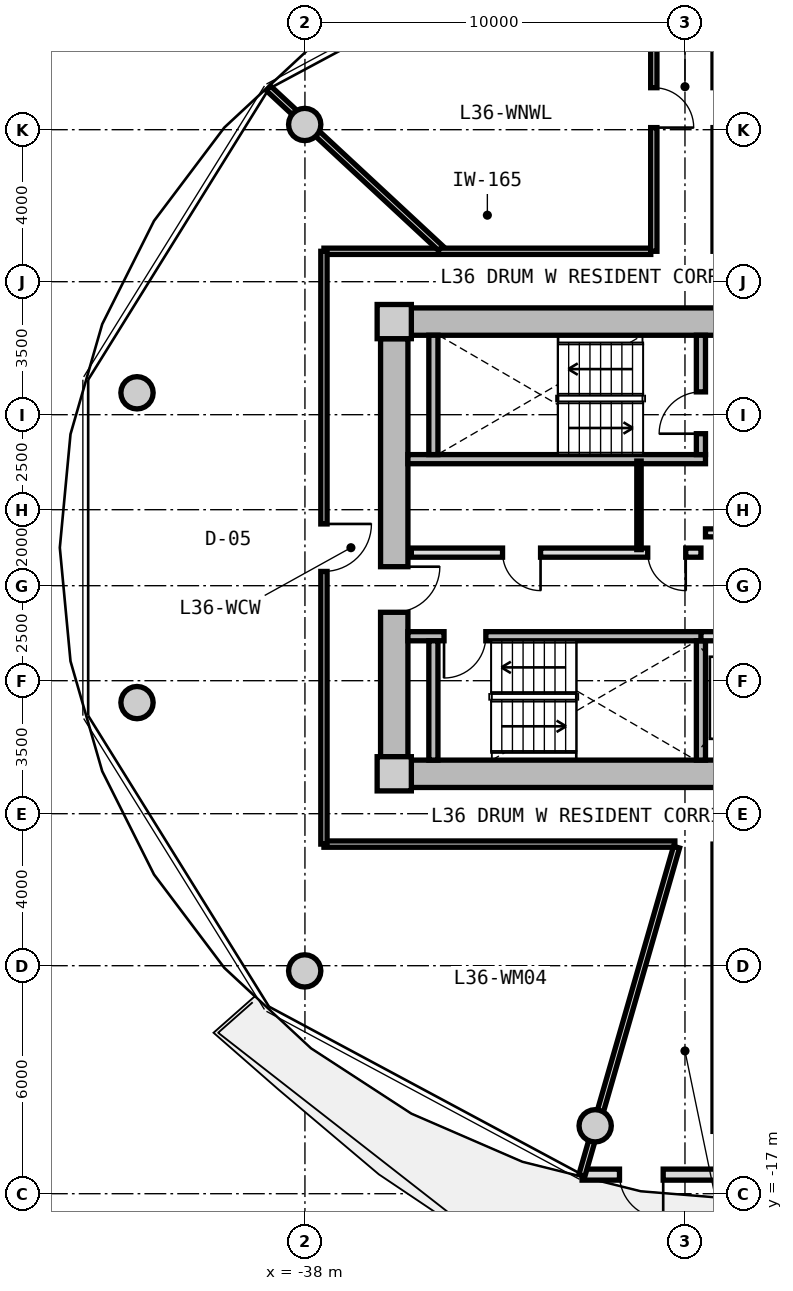
"""IFC4 building model, lengths in metres.
Left out: names, types, materials, properties, quantities, classifications, styles, units other than length and angle.
Written with IfcOpenShell. Run it as: python <this file> out.ifc"""

import sys

from ifc_helpers import new_model, si_unit, direction, frame, frame_2d, origin, origin_2d, place, context, subcontext, project, spatial, rectangle, circle, extrude, source, transform, mapped, element, fill, save


model = new_model("IFC4")
c1 = context("Model", 3, precision=1e-05, world=origin(), true_north=direction((0.0, 1.0)))
c2 = subcontext(c1, "Body", "Model", "MODEL_VIEW")
j1 = project(units=[si_unit("LENGTHUNIT", "METRE"), si_unit("PLANEANGLEUNIT", "RADIAN")], contexts=[c1])
p1 = place(None, origin())
s1 = spatial("IfcSite", under=j1, at=p1, CompositionType="ELEMENT")
p2 = place(p1, origin())
s2 = spatial("IfcBuilding", under=s1, at=p2, CompositionType="ELEMENT")
p3 = place(p2, frame((0.0, 0.0, 117.6)))
s3 = spatial("IfcBuildingStorey", under=s2, at=p3, CompositionType="ELEMENT", Elevation=117.6)
m1 = source(origin(), c2, "Body", "SweptSolid", [
    extrude(rectangle(XDim=0.9, YDim=0.9, at=origin_2d()), origin(), (0.0, 0.0, 1.0), 3.05),
])
for number, where, z_axis, x_axis in (
    (1, (-35.65, -5.95, 0.0), (0.0, 0.0, 1.0), (1.0, 0.0, 0.0)),
    (2, (-35.65, 5.95, 0.0), (0.0, 0.0, 1.0), (1.0, 0.0, 0.0)),
):
    element("IfcColumn", number, at=place(p3, frame(where, z_axis=z_axis, x_axis=x_axis)), inside=s3, PredefinedType="COLUMN", context=c2, shape_type="MappedRepresentation", body=[
        mapped(m1, transform((0.0, 0.0, 0.0), x_axis=(1.0, 0.0, 0.0), y_axis=(0.0, 1.0, 0.0), z_axis=(0.0, 0.0, 1.0), scale=1.0)),
    ])
m2 = source(origin(), c2, "Body", "SweptSolid", [
    extrude(rectangle(XDim=14.4, YDim=0.72, at=frame_2d((7.2, 0.0))), origin(), (0.0, 0.0, 1.0), 2.79),
])
for number, where, z_axis, x_axis in (
    (3, (-35.2, 5.95, 0.0), (0.0, 0.0, 1.0), (1.0, 0.0, 0.0)),
    (4, (-20.8, -5.95, 0.0), (0.0, 0.0, 1.0), (-1.0, 0.0, 0.0)),
):
    element("IfcWall", number, at=place(p3, frame(where, z_axis=z_axis, x_axis=x_axis)), inside=s3, PredefinedType="SHEAR", context=c2, shape_type="MappedRepresentation", body=[
        mapped(m2, transform((0.0, 0.0, 0.0), x_axis=(1.0, 0.0, 0.0), y_axis=(0.0, 1.0, 0.0), z_axis=(0.0, 0.0, 1.0), scale=1.0)),
    ])
m3 = source(origin(), c2, "Body", "SweptSolid", [
    extrude(rectangle(XDim=11.0, YDim=0.72, at=frame_2d((5.5, 0.0))), origin(), (0.0, 0.0, 1.0), 2.79),
])
p4 = place(p3, frame((-35.65, -5.5, 0.0), z_axis=(0.0, 0.0, 1.0), x_axis=(0.0, 1.0, 0.0)))
e5 = element("IfcWall", 5, at=p4, inside=s3, PredefinedType="SHEAR", context=c2, shape_type="MappedRepresentation", body=[
    mapped(m3, transform((0.0, 0.0, 0.0), x_axis=(1.0, 0.0, 0.0), y_axis=(0.0, 1.0, 0.0), z_axis=(0.0, 0.0, 1.0), scale=1.0)),
])
p5 = place(p4, frame((3.8, 0.0, 0.0)))
e6 = element("IfcOpeningElement", 6, at=p5, cuts=e5, PredefinedType="OPENING", context=c2, shape_type="SweptSolid", body=[
    extrude(rectangle(XDim=1.2, YDim=2.15, at=frame_2d((0.6, 1.075))), frame((0.0, 0.37, 0.0), z_axis=(0.0, -1.0, 0.0), x_axis=(1.0, 0.0, 0.0)), (0.0, 0.0, 1.0), 0.74),
])
m4 = source(origin(), c2, "Body", "SweptSolid", [
    extrude(circle(Radius=0.425, at=origin_2d()), origin(), (0.0, 0.0, 1.0), 3.05),
])
for number, where, z_axis, x_axis in (
    (7, (-38.006, 11.137, 0.0), (0.0, 0.0, 1.0), (1.0, 0.0, 0.0)),
    (8, (-42.419, 4.076, 0.0), (0.0, 0.0, 1.0), (1.0, 0.0, 0.0)),
    (9, (-42.419, -4.076, 0.0), (0.0, 0.0, 1.0), (1.0, 0.0, 0.0)),
    (10, (-38.006, -11.137, 0.0), (0.0, 0.0, 1.0), (1.0, 0.0, 0.0)),
    (11, (-30.363, -15.213, 0.0), (0.0, 0.0, 1.0), (1.0, 0.0, 0.0)),
):
    element("IfcColumn", number, at=place(p3, frame(where, z_axis=z_axis, x_axis=x_axis)), inside=s3, PredefinedType="COLUMN", context=c2, shape_type="MappedRepresentation", body=[
        mapped(m4, transform((0.0, 0.0, 0.0), x_axis=(1.0, 0.0, 0.0), y_axis=(0.0, 1.0, 0.0), z_axis=(0.0, 0.0, 1.0), scale=1.0)),
    ])
m5 = source(origin(), c2, "Body", "SweptSolid", [
    extrude(rectangle(XDim=9.514, YDim=0.29, at=frame_2d((4.757, 0.0))), origin(), (0.0, 0.0, 1.0), 2.79),
])
p6 = place(p3, frame((-21.193, -16.498, 0.0), z_axis=(0.0, 0.0, 1.0), x_axis=(-1.0, 0.0, 0.0)))
e12 = element("IfcWall", 12, at=p6, inside=s3, PredefinedType="SOLIDWALL", context=c2, shape_type="MappedRepresentation", body=[
    mapped(m5, transform((0.0, 0.0, 0.0), x_axis=(1.0, 0.0, 0.0), y_axis=(0.0, 1.0, 0.0), z_axis=(0.0, 0.0, 1.0), scale=1.0)),
])
p7 = place(p6, frame((7.38, 0.0, 0.0)))
e13 = element("IfcOpeningElement", 13, at=p7, cuts=e12, PredefinedType="OPENING", context=c2, shape_type="SweptSolid", body=[
    extrude(rectangle(XDim=1.15, YDim=2.25, at=frame_2d((0.575, 1.125))), frame((0.0, 0.155, 0.0), z_axis=(0.0, -1.0, 0.0), x_axis=(1.0, 0.0, 0.0)), (0.0, 0.0, 1.0), 0.31),
])
p8 = place(p6, frame((0.85, 0.0, 0.85)))
e14 = element("IfcOpeningElement", 14, at=p8, cuts=e12, PredefinedType="OPENING", context=c2, shape_type="SweptSolid", body=[
    extrude(rectangle(XDim=1.2, YDim=1.5, at=frame_2d((0.6, 0.75))), frame((0.0, 0.155, 0.0), z_axis=(0.0, -1.0, 0.0), x_axis=(1.0, 0.0, 0.0)), (0.0, 0.0, 1.0), 0.31),
])
m6 = source(origin(), c2, "Body", "SweptSolid", [
    extrude(rectangle(XDim=7.83, YDim=0.24, at=frame_2d((3.915, 0.0))), origin(), (0.0, 0.0, 1.0), 2.79),
])
p9 = place(p3, frame((-35.29, 2.33, 0.0), z_axis=(0.0, 0.0, 1.0), x_axis=(1.0, 0.0, 0.0)))
e15 = element("IfcWall", 15, at=p9, inside=s3, PredefinedType="PARTITIONING", context=c2, shape_type="MappedRepresentation", body=[
    mapped(m6, transform((0.0, 0.0, 0.0), x_axis=(1.0, 0.0, 0.0), y_axis=(0.0, 1.0, 0.0), z_axis=(0.0, 0.0, 1.0), scale=1.0)),
])
m7 = source(origin(), c2, "Body", "SweptSolid", [
    extrude(rectangle(XDim=3.14, YDim=0.24, at=frame_2d((1.57, 0.0))), origin(), (0.0, 0.0, 1.0), 2.79),
])
p10 = place(p3, frame((-34.62, 2.45, 0.0), z_axis=(0.0, 0.0, 1.0), x_axis=(0.0, 1.0, 0.0)))
e16 = element("IfcWall", 16, at=p10, inside=s3, PredefinedType="PARTITIONING", context=c2, shape_type="MappedRepresentation", body=[
    mapped(m7, transform((0.0, 0.0, 0.0), x_axis=(1.0, 0.0, 0.0), y_axis=(0.0, 1.0, 0.0), z_axis=(0.0, 0.0, 1.0), scale=1.0)),
])
p11 = place(p3, frame((-27.58, 2.45, 0.0), z_axis=(0.0, 0.0, 1.0), x_axis=(0.0, 1.0, 0.0)))
e17 = element("IfcWall", 17, at=p11, inside=s3, PredefinedType="PARTITIONING", context=c2, shape_type="MappedRepresentation", body=[
    mapped(m7, transform((0.0, 0.0, 0.0), x_axis=(1.0, 0.0, 0.0), y_axis=(0.0, 1.0, 0.0), z_axis=(0.0, 0.0, 1.0), scale=1.0)),
])
p12 = place(p11, frame((0.55, 0.0, 0.0)))
e18 = element("IfcOpeningElement", 18, at=p12, cuts=e17, PredefinedType="OPENING", context=c2, shape_type="SweptSolid", body=[
    extrude(rectangle(XDim=1.1, YDim=2.15, at=frame_2d((0.55, 1.075))), frame((0.0, 0.13, 0.0), z_axis=(0.0, -1.0, 0.0), x_axis=(1.0, 0.0, 0.0)), (0.0, 0.0, 1.0), 0.26),
])
p13 = place(p3, frame((-35.29, -2.33, 0.0), z_axis=(0.0, 0.0, 1.0), x_axis=(1.0, 0.0, 0.0)))
e19 = element("IfcWall", 19, at=p13, inside=s3, PredefinedType="PARTITIONING", context=c2, shape_type="MappedRepresentation", body=[
    mapped(m6, transform((0.0, 0.0, 0.0), x_axis=(1.0, 0.0, 0.0), y_axis=(0.0, 1.0, 0.0), z_axis=(0.0, 0.0, 1.0), scale=1.0)),
])
p14 = place(p13, frame((0.95, 0.0, 0.0)))
e20 = element("IfcOpeningElement", 20, at=p14, cuts=e19, PredefinedType="OPENING", context=c2, shape_type="SweptSolid", body=[
    extrude(rectangle(XDim=1.1, YDim=2.15, at=frame_2d((0.55, 1.075))), frame((0.0, 0.13, 0.0), z_axis=(0.0, -1.0, 0.0), x_axis=(1.0, 0.0, 0.0)), (0.0, 0.0, 1.0), 0.26),
])
for number, where, z_axis, x_axis in (
    (21, (-34.62, -5.59, 0.0), (0.0, 0.0, 1.0), (0.0, 1.0, 0.0)),
    (22, (-27.58, -5.59, 0.0), (0.0, 0.0, 1.0), (0.0, 1.0, 0.0)),
):
    element("IfcWall", number, at=place(p3, frame(where, z_axis=z_axis, x_axis=x_axis)), inside=s3, PredefinedType="PARTITIONING", context=c2, shape_type="MappedRepresentation", body=[
        mapped(m7, transform((0.0, 0.0, 0.0), x_axis=(1.0, 0.0, 0.0), y_axis=(0.0, 1.0, 0.0), z_axis=(0.0, 0.0, 1.0), scale=1.0)),
    ])
m8 = source(origin(), c2, "Body", "SweptSolid", [
    extrude(rectangle(XDim=6.66, YDim=0.21, at=frame_2d((3.33, 0.0))), origin(), (0.0, 0.0, 1.0), 2.775),
])
p15 = place(p3, frame((-27.46, 0.39, 0.0), z_axis=(0.0, 0.0, 1.0), x_axis=(1.0, 0.0, 0.0)))
e23 = element("IfcWall", 23, at=p15, inside=s3, PredefinedType="PARTITIONING", context=c2, shape_type="MappedRepresentation", body=[
    mapped(m8, transform((0.0, 0.0, 0.0), x_axis=(1.0, 0.0, 0.0), y_axis=(0.0, 1.0, 0.0), z_axis=(0.0, 0.0, 1.0), scale=1.0)),
])
p16 = place(p15, frame((1.0, 0.0, 0.0)))
e24 = element("IfcOpeningElement", 24, at=p16, cuts=e23, PredefinedType="OPENING", context=c2, shape_type="SweptSolid", body=[
    extrude(rectangle(XDim=1.2, YDim=2.15, at=frame_2d((0.6, 1.075))), frame((0.0, 0.115, 0.0), z_axis=(0.0, -1.0, 0.0), x_axis=(1.0, 0.0, 0.0)), (0.0, 0.0, 1.0), 0.23),
])
m9 = source(origin(), c2, "Body", "SweptSolid", [
    extrude(rectangle(XDim=7.62, YDim=0.24, at=frame_2d((3.81, 0.0))), origin(), (0.0, 0.0, 1.0), 2.775),
])
p17 = place(p3, frame((-35.2, -0.13, 0.0), z_axis=(0.0, 0.0, 1.0), x_axis=(1.0, 0.0, 0.0)))
e25 = element("IfcWall", 25, at=p17, inside=s3, PredefinedType="PARTITIONING", context=c2, shape_type="MappedRepresentation", body=[
    mapped(m9, transform((0.0, 0.0, 0.0), x_axis=(1.0, 0.0, 0.0), y_axis=(0.0, 1.0, 0.0), z_axis=(0.0, 0.0, 1.0), scale=1.0)),
])
p18 = place(p17, frame((6.22, 0.0, 0.0)))
e26 = element("IfcOpeningElement", 26, at=p18, cuts=e25, PredefinedType="OPENING", context=c2, shape_type="SweptSolid", body=[
    extrude(rectangle(XDim=1.0, YDim=2.1, at=frame_2d((0.5, 1.05))), frame((0.0, 0.13, 0.0), z_axis=(0.0, -1.0, 0.0), x_axis=(1.0, 0.0, 0.0)), (0.0, 0.0, 1.0), 0.26),
])
p19 = place(p17, frame((2.4, 0.0, 0.0)))
e27 = element("IfcOpeningElement", 27, at=p19, cuts=e25, PredefinedType="OPENING", context=c2, shape_type="SweptSolid", body=[
    extrude(rectangle(XDim=1.0, YDim=2.1, at=frame_2d((0.5, 1.05))), frame((0.0, 0.13, 0.0), z_axis=(0.0, -1.0, 0.0), x_axis=(1.0, 0.0, 0.0)), (0.0, 0.0, 1.0), 0.26),
])
m10 = source(origin(), c2, "Body", "SweptSolid", [
    extrude(rectangle(XDim=2.33, YDim=0.115, at=frame_2d((1.165, 0.0))), origin(), (0.0, 0.0, 1.0), 2.775),
])
p20 = place(p3, frame((-29.21, -0.05, 0.0), z_axis=(0.0, 0.0, 1.0), x_axis=(0.0, 1.0, 0.0)))
e28 = element("IfcWall", 28, at=p20, inside=s3, PredefinedType="PARTITIONING", context=c2, shape_type="MappedRepresentation", body=[
    mapped(m10, transform((0.0, 0.0, 0.0), x_axis=(1.0, 0.0, 0.0), y_axis=(0.0, 1.0, 0.0), z_axis=(0.0, 0.0, 1.0), scale=1.0)),
])
m11 = source(origin(), c2, "Body", "SweptSolid", [
    extrude(rectangle(XDim=4.13, YDim=0.24, at=frame_2d((2.065, 0.0))), origin(), (0.0, 0.0, 1.0), 2.775),
])
p21 = place(p3, frame((-27.58, -2.33, 0.0), z_axis=(0.0, 0.0, 1.0), x_axis=(1.0, 0.0, 0.0)))
e29 = element("IfcWall", 29, at=p21, inside=s3, PredefinedType="PARTITIONING", context=c2, shape_type="MappedRepresentation", body=[
    mapped(m11, transform((0.0, 0.0, 0.0), x_axis=(1.0, 0.0, 0.0), y_axis=(0.0, 1.0, 0.0), z_axis=(0.0, 0.0, 1.0), scale=1.0)),
])
p22 = place(p21, frame((0.5, 0.0, 0.0)))
e30 = element("IfcOpeningElement", 30, at=p22, cuts=e29, PredefinedType="OPENING", context=c2, shape_type="SweptSolid", body=[
    extrude(rectangle(XDim=1.1, YDim=2.2, at=frame_2d((0.55, 1.1))), frame((0.0, 0.13, 0.0), z_axis=(0.0, -1.0, 0.0), x_axis=(1.0, 0.0, 0.0)), (0.0, 0.0, 1.0), 0.26),
])
m12 = source(origin(), c2, "Body", "SweptSolid", [
    extrude(rectangle(XDim=8.6, YDim=0.165, at=frame_2d((4.3, 0.0))), origin(), (0.0, 0.0, 1.0), 2.775),
])
p23 = place(p3, frame((-37.5, 7.8, 0.0), z_axis=(0.0, 0.0, 1.0), x_axis=(1.0, 0.0, 0.0)))
e31 = element("IfcWall", 31, at=p23, inside=s3, PredefinedType="PARTITIONING", context=c2, shape_type="MappedRepresentation", body=[
    mapped(m12, transform((0.0, 0.0, 0.0), x_axis=(1.0, 0.0, 0.0), y_axis=(0.0, 1.0, 0.0), z_axis=(0.0, 0.0, 1.0), scale=1.0)),
])
m13 = source(origin(), c2, "Body", "SweptSolid", [
    extrude(rectangle(XDim=9.234, YDim=0.165, at=frame_2d((4.617, 0.0))), origin(), (0.0, 0.0, 1.0), 2.775),
])
p24 = place(p3, frame((-28.266, -7.8, 0.0), z_axis=(0.0, 0.0, 1.0), x_axis=(-1.0, 0.0, 0.0)))
e32 = element("IfcWall", 32, at=p24, inside=s3, PredefinedType="PARTITIONING", context=c2, shape_type="MappedRepresentation", body=[
    mapped(m13, transform((0.0, 0.0, 0.0), x_axis=(1.0, 0.0, 0.0), y_axis=(0.0, 1.0, 0.0), z_axis=(0.0, 0.0, 1.0), scale=1.0)),
])
m14 = source(origin(), c2, "Body", "SweptSolid", [
    extrude(rectangle(XDim=15.6, YDim=0.165, at=frame_2d((7.8, 0.0))), origin(), (0.0, 0.0, 1.0), 2.775),
])
p25 = place(p3, frame((-37.5, -7.8, 0.0), z_axis=(0.0, 0.0, 1.0), x_axis=(0.0, 1.0, 0.0)))
e33 = element("IfcWall", 33, at=p25, inside=s3, PredefinedType="PARTITIONING", context=c2, shape_type="MappedRepresentation", body=[
    mapped(m14, transform((0.0, 0.0, 0.0), x_axis=(1.0, 0.0, 0.0), y_axis=(0.0, 1.0, 0.0), z_axis=(0.0, 0.0, 1.0), scale=1.0)),
])
p26 = place(p25, frame((7.175, 0.0, 0.0)))
e34 = element("IfcOpeningElement", 34, at=p26, cuts=e33, PredefinedType="OPENING", context=c2, shape_type="SweptSolid", body=[
    extrude(rectangle(XDim=1.25, YDim=2.2, at=frame_2d((0.625, 1.1))), frame((0.0, 0.093, 0.0), z_axis=(0.0, -1.0, 0.0), x_axis=(1.0, 0.0, 0.0)), (0.0, 0.0, 1.0), 0.185),
])
m15 = source(origin(), c2, "Body", "SweptSolid", [
    extrude(rectangle(XDim=6.187, YDim=0.165, at=frame_2d((3.093, 0.0))), origin(), (0.0, 0.0, 1.0), 2.275),
])
p27 = place(p3, frame((-34.429, 7.88, 0.0), z_axis=(0.0, 0.0, 1.0), x_axis=(-0.732501077882, 0.680765870841, 0.0)))
e35 = element("IfcWall", 35, at=p27, inside=s3, PredefinedType="PARTITIONING", context=c2, shape_type="MappedRepresentation", body=[
    mapped(m15, transform((0.0, 0.0, 0.0), x_axis=(1.0, 0.0, 0.0), y_axis=(0.0, 1.0, 0.0), z_axis=(0.0, 0.0, 1.0), scale=1.0)),
])
m16 = source(origin(), c2, "Body", "SweptSolid", [
    extrude(rectangle(XDim=8.989, YDim=0.165, at=frame_2d((4.495, 0.0))), origin(), (0.0, 0.0, 1.0), 2.275),
])
p28 = place(p3, frame((-28.222, -7.88, 0.0), z_axis=(0.0, 0.0, 1.0), x_axis=(-0.27702323008, -0.960863221274, 0.0)))
e36 = element("IfcWall", 36, at=p28, inside=s3, PredefinedType="PARTITIONING", context=c2, shape_type="MappedRepresentation", body=[
    mapped(m16, transform((0.0, 0.0, 0.0), x_axis=(1.0, 0.0, 0.0), y_axis=(0.0, 1.0, 0.0), z_axis=(0.0, 0.0, 1.0), scale=1.0)),
])
m17 = source(origin(), c2, "Body", "SweptSolid", [
    extrude(rectangle(XDim=7.56, YDim=0.165, at=frame_2d((3.78, 0.0))), origin(), (0.0, 0.0, 1.0), 2.775),
])
p29 = place(p3, frame((-28.82, 7.8, 0.0), z_axis=(0.0, 0.0, 1.0), x_axis=(0.0, 1.0, 0.0)))
e37 = element("IfcWall", 37, at=p29, inside=s3, PredefinedType="PARTITIONING", context=c2, shape_type="MappedRepresentation", body=[
    mapped(m17, transform((0.0, 0.0, 0.0), x_axis=(1.0, 0.0, 0.0), y_axis=(0.0, 1.0, 0.0), z_axis=(0.0, 0.0, 1.0), scale=1.0)),
])
p30 = place(p29, frame((3.255, 0.0, 0.0)))
e38 = element("IfcOpeningElement", 38, at=p30, cuts=e37, PredefinedType="OPENING", context=c2, shape_type="SweptSolid", body=[
    extrude(rectangle(XDim=1.05, YDim=2.15, at=frame_2d((0.525, 1.075))), frame((0.0, 0.093, 0.0), z_axis=(0.0, -1.0, 0.0), x_axis=(1.0, 0.0, 0.0)), (0.0, 0.0, 1.0), 0.185),
])
m18 = source(origin(), c2, "Body", "SweptSolid", [
    extrude(rectangle(XDim=1.15, YDim=2.25, at=frame_2d((0.575, 1.125))), frame((0.0, 0.025, 0.0), z_axis=(0.0, -1.0, 0.0), x_axis=(1.0, 0.0, 0.0)), (0.0, 0.0, 1.0), 0.05),
])
p31 = place(p7, origin())
e39 = element("IfcDoor", 39, at=p31, inside=s3, OperationType="SINGLE_SWING_LEFT", PredefinedType="DOOR", context=c2, shape_type="MappedRepresentation", body=[
    mapped(m18, transform((0.0, 0.0, 0.0), x_axis=(1.0, 0.0, 0.0), y_axis=(0.0, 1.0, 0.0), z_axis=(0.0, 0.0, 1.0), scale=1.0)),
])
fill(e13, e39)
m19 = source(origin(), c2, "Body", "SweptSolid", [
    extrude(rectangle(XDim=1.1, YDim=2.15, at=frame_2d((0.55, 1.075))), frame((0.0, 0.025, 0.0), z_axis=(0.0, -1.0, 0.0), x_axis=(1.0, 0.0, 0.0)), (0.0, 0.0, 1.0), 0.05),
])
p32 = place(p12, origin())
e40 = element("IfcDoor", 40, at=p32, inside=s3, OperationType="SINGLE_SWING_LEFT", PredefinedType="DOOR", context=c2, shape_type="MappedRepresentation", body=[
    mapped(m19, transform((0.0, 0.0, 0.0), x_axis=(1.0, 0.0, 0.0), y_axis=(0.0, 1.0, 0.0), z_axis=(0.0, 0.0, 1.0), scale=1.0)),
])
fill(e18, e40)
p33 = place(p14, frame((1.1, 0.0, 0.0), z_axis=(0.0, 0.0, 1.0), x_axis=(-1.0, 0.0, 0.0)))
e41 = element("IfcDoor", 41, at=p33, inside=s3, OperationType="SINGLE_SWING_RIGHT", PredefinedType="DOOR", context=c2, shape_type="MappedRepresentation", body=[
    mapped(m19, transform((0.0, 0.0, 0.0), x_axis=(1.0, 0.0, 0.0), y_axis=(0.0, 1.0, 0.0), z_axis=(0.0, 0.0, 1.0), scale=1.0)),
])
fill(e20, e41)
m20 = source(origin(), c2, "Body", "SweptSolid", [
    extrude(rectangle(XDim=1.2, YDim=2.15, at=frame_2d((0.6, 1.075))), frame((0.0, 0.025, 0.0), z_axis=(0.0, -1.0, 0.0), x_axis=(1.0, 0.0, 0.0)), (0.0, 0.0, 1.0), 0.05),
])
p34 = place(p5, frame((1.2, 0.0, 0.0), z_axis=(0.0, 0.0, 1.0), x_axis=(-1.0, 0.0, 0.0)))
e42 = element("IfcDoor", 42, at=p34, inside=s3, OperationType="SINGLE_SWING_LEFT", PredefinedType="DOOR", context=c2, shape_type="MappedRepresentation", body=[
    mapped(m20, transform((0.0, 0.0, 0.0), x_axis=(1.0, 0.0, 0.0), y_axis=(0.0, 1.0, 0.0), z_axis=(0.0, 0.0, 1.0), scale=1.0)),
])
fill(e6, e42)
m21 = source(origin(), c2, "Body", "SweptSolid", [
    extrude(rectangle(XDim=1.0, YDim=2.1, at=frame_2d((0.5, 1.05))), frame((0.0, 0.025, 0.0), z_axis=(0.0, -1.0, 0.0), x_axis=(1.0, 0.0, 0.0)), (0.0, 0.0, 1.0), 0.05),
])
p35 = place(p18, frame((1.0, 0.0, 0.0), z_axis=(0.0, 0.0, 1.0), x_axis=(-1.0, 0.0, 0.0)))
e43 = element("IfcDoor", 43, at=p35, inside=s3, OperationType="SINGLE_SWING_LEFT", PredefinedType="DOOR", context=c2, shape_type="MappedRepresentation", body=[
    mapped(m21, transform((0.0, 0.0, 0.0), x_axis=(1.0, 0.0, 0.0), y_axis=(0.0, 1.0, 0.0), z_axis=(0.0, 0.0, 1.0), scale=1.0)),
])
fill(e26, e43)
p36 = place(p19, frame((1.0, 0.0, 0.0), z_axis=(0.0, 0.0, 1.0), x_axis=(-1.0, 0.0, 0.0)))
e44 = element("IfcDoor", 44, at=p36, inside=s3, OperationType="SINGLE_SWING_LEFT", PredefinedType="DOOR", context=c2, shape_type="MappedRepresentation", body=[
    mapped(m21, transform((0.0, 0.0, 0.0), x_axis=(1.0, 0.0, 0.0), y_axis=(0.0, 1.0, 0.0), z_axis=(0.0, 0.0, 1.0), scale=1.0)),
])
fill(e27, e44)
m22 = source(origin(), c2, "Body", "SweptSolid", [
    extrude(rectangle(XDim=1.05, YDim=2.15, at=frame_2d((0.525, 1.075))), frame((0.0, 0.025, 0.0), z_axis=(0.0, -1.0, 0.0), x_axis=(1.0, 0.0, 0.0)), (0.0, 0.0, 1.0), 0.05),
])
p37 = place(p30, frame((1.05, 0.0, 0.0), z_axis=(0.0, 0.0, 1.0), x_axis=(-1.0, 0.0, 0.0)))
e45 = element("IfcDoor", 45, at=p37, inside=s3, OperationType="SINGLE_SWING_RIGHT", PredefinedType="DOOR", context=c2, shape_type="MappedRepresentation", body=[
    mapped(m22, transform((0.0, 0.0, 0.0), x_axis=(1.0, 0.0, 0.0), y_axis=(0.0, 1.0, 0.0), z_axis=(0.0, 0.0, 1.0), scale=1.0)),
])
fill(e38, e45)
m23 = source(origin(), c2, "Body", "SweptSolid", [
    extrude(rectangle(XDim=1.25, YDim=2.2, at=frame_2d((0.625, 1.1))), frame((0.0, 0.025, 0.0), z_axis=(0.0, -1.0, 0.0), x_axis=(1.0, 0.0, 0.0)), (0.0, 0.0, 1.0), 0.05),
])
p38 = place(p26, frame((1.25, 0.0, 0.0), z_axis=(0.0, 0.0, 1.0), x_axis=(-1.0, 0.0, 0.0)))
e46 = element("IfcDoor", 46, at=p38, inside=s3, OperationType="SINGLE_SWING_LEFT", PredefinedType="DOOR", context=c2, shape_type="MappedRepresentation", body=[
    mapped(m23, transform((0.0, 0.0, 0.0), x_axis=(1.0, 0.0, 0.0), y_axis=(0.0, 1.0, 0.0), z_axis=(0.0, 0.0, 1.0), scale=1.0)),
])
fill(e34, e46)
save(model, sys.argv[1])
